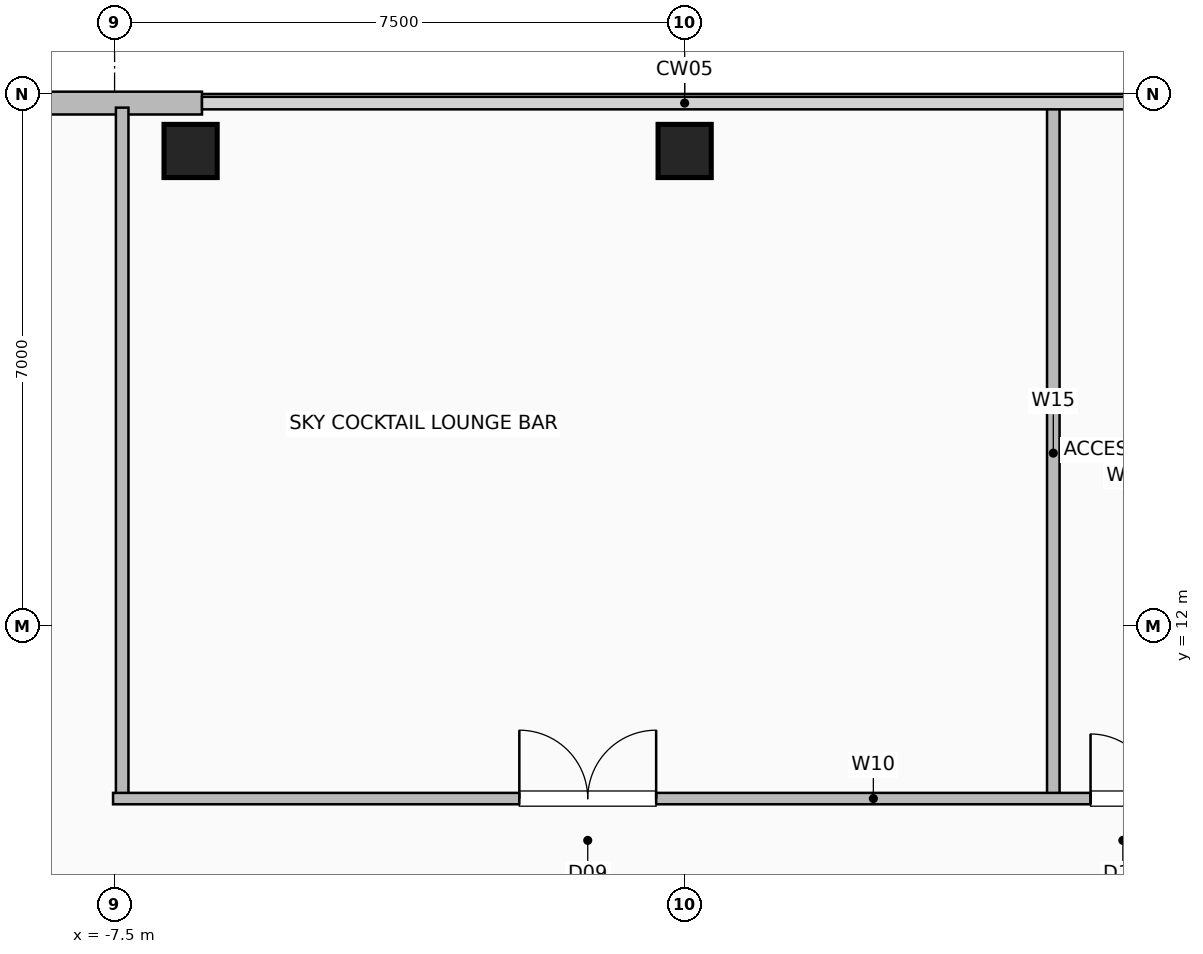
"""IFC4 building model, lengths in metres.
Left out: names, types, materials, properties, quantities, classifications, styles, units other than length and angle.
Written with IfcOpenShell. Run it as: python <this file> out.ifc"""

import sys

from ifc_helpers import new_model, si_unit, direction, frame, frame_2d, origin, origin_2d, place, context, subcontext, project, spatial, rectangle, hollow_rectangle, extrude, element, fill, save


model = new_model("IFC4")
c1 = context("Model", 3, precision=1e-05, world=origin(), true_north=direction((0.0, 1.0)))
c2 = subcontext(c1, "Body", "Model", "MODEL_VIEW")
j1 = project(units=[si_unit("LENGTHUNIT", "METRE"), si_unit("PLANEANGLEUNIT", "RADIAN")], contexts=[c1])
p1 = place(None, origin())
s1 = spatial("IfcSite", under=j1, at=p1, CompositionType="ELEMENT")
p2 = place(p1, origin())
s2 = spatial("IfcBuilding", under=s1, at=p2, CompositionType="ELEMENT")
p3 = place(p2, frame((0.0, 0.0, 257.6)))
s3 = spatial("IfcBuildingStorey", under=s2, at=p3, CompositionType="ELEMENT", Elevation=257.6)
for number, where, z_axis, x_axis in (
    (1, (-6.5, 18.25, 0.0), (0.0, 0.0, 1.0), (1.0, 0.0, 0.0)),
    (2, (0.0, 18.25, 0.0), (0.0, 0.0, 1.0), (1.0, 0.0, 0.0)),
):
    element("IfcColumn", number, at=place(p3, frame(where, z_axis=z_axis, x_axis=x_axis)), inside=s3, PredefinedType="COLUMN", context=c2, shape_type="SweptSolid", body=[
        extrude(hollow_rectangle(XDim=0.7, YDim=0.7, WallThickness=0.035, at=origin_2d()), origin(), (0.0, 0.0, 1.0), 3.6),
    ])
p4 = place(p3, frame((-11.65, 18.88, 0.0), z_axis=(0.0, 0.0, 1.0), x_axis=(1.0, 0.0, 0.0)))
e3 = element("IfcWall", 3, at=p4, inside=s3, PredefinedType="SOLIDWALL", context=c2, shape_type="SweptSolid", body=[
    extrude(rectangle(XDim=5.3, YDim=0.3, at=frame_2d((2.65, 0.0))), origin(), (0.0, 0.0, 1.0), 3.36),
])
for number, where, z_axis, x_axis in (
    (4, (-7.4, 9.73, 0.0), (0.0, 0.0, 1.0), (0.0, 1.0, 0.0)),
    (5, (4.85, 9.73, 0.0), (0.0, 0.0, 1.0), (0.0, 1.0, 0.0)),
):
    element("IfcWall", number, at=place(p3, frame(where, z_axis=z_axis, x_axis=x_axis)), inside=s3, PredefinedType="PLUMBINGWALL", context=c2, shape_type="SweptSolid", body=[
        extrude(rectangle(XDim=9.09, YDim=0.165, at=frame_2d((4.545, 0.0))), origin(), (0.0, 0.0, 1.0), 3.36),
    ])
p5 = place(p3, frame((-7.52, 9.73, 0.0), z_axis=(0.0, 0.0, 1.0), x_axis=(1.0, 0.0, 0.0)))
e6 = element("IfcWall", 6, at=p5, inside=s3, PredefinedType="PARTITIONING", context=c2, shape_type="SweptSolid", body=[
    extrude(rectangle(XDim=20.09, YDim=0.15, at=frame_2d((10.045, 0.0))), origin(), (0.0, 0.0, 1.0), 3.36),
])
p6 = place(p5, frame((5.345, 0.0, 0.0)))
e7 = element("IfcOpeningElement", 7, at=p6, cuts=e6, PredefinedType="OPENING", context=c2, shape_type="SweptSolid", body=[
    extrude(rectangle(XDim=1.8, YDim=2.08, at=frame_2d((0.9, 1.04))), frame((0.0, 0.085, 0.0), z_axis=(0.0, -1.0, 0.0), x_axis=(1.0, 0.0, 0.0)), (0.0, 0.0, 1.0), 0.17),
])
p7 = place(p5, frame((12.86, 0.0, 0.0)))
e8 = element("IfcOpeningElement", 8, at=p7, cuts=e6, PredefinedType="OPENING", context=c2, shape_type="SweptSolid", body=[
    extrude(rectangle(XDim=0.85, YDim=2.05, at=frame_2d((0.425, 1.025))), frame((0.0, 0.085, 0.0), z_axis=(0.0, -1.0, 0.0), x_axis=(1.0, 0.0, 0.0)), (0.0, 0.0, 1.0), 0.17),
])
p8 = place(p5, frame((16.61, 0.0, 0.0)))
e9 = element("IfcOpeningElement", 9, at=p8, cuts=e6, PredefinedType="OPENING", context=c2, shape_type="SweptSolid", body=[
    extrude(rectangle(XDim=0.95, YDim=2.06, at=frame_2d((0.475, 1.03))), frame((0.0, 0.085, 0.0), z_axis=(0.0, -1.0, 0.0), x_axis=(1.0, 0.0, 0.0)), (0.0, 0.0, 1.0), 0.17),
])
p9 = place(p6, origin())
e10 = element("IfcDoor", 10, at=p9, inside=s3, OperationType="DOUBLE_DOOR_SINGLE_SWING", PredefinedType="DOOR", context=c2, shape_type="SweptSolid", body=[
    extrude(rectangle(XDim=1.8, YDim=2.08, at=frame_2d((0.9, 1.04))), frame((0.0, 0.025, 0.0), z_axis=(0.0, -1.0, 0.0), x_axis=(1.0, 0.0, 0.0)), (0.0, 0.0, 1.0), 0.05),
])
fill(e7, e10)
p10 = place(p7, origin())
e11 = element("IfcDoor", 11, at=p10, inside=s3, OperationType="SINGLE_SWING_LEFT", PredefinedType="DOOR", context=c2, shape_type="SweptSolid", body=[
    extrude(rectangle(XDim=0.85, YDim=2.05, at=frame_2d((0.425, 1.025))), frame((0.0, 0.025, 0.0), z_axis=(0.0, -1.0, 0.0), x_axis=(1.0, 0.0, 0.0)), (0.0, 0.0, 1.0), 0.05),
])
fill(e8, e11)
save(model, sys.argv[1])
